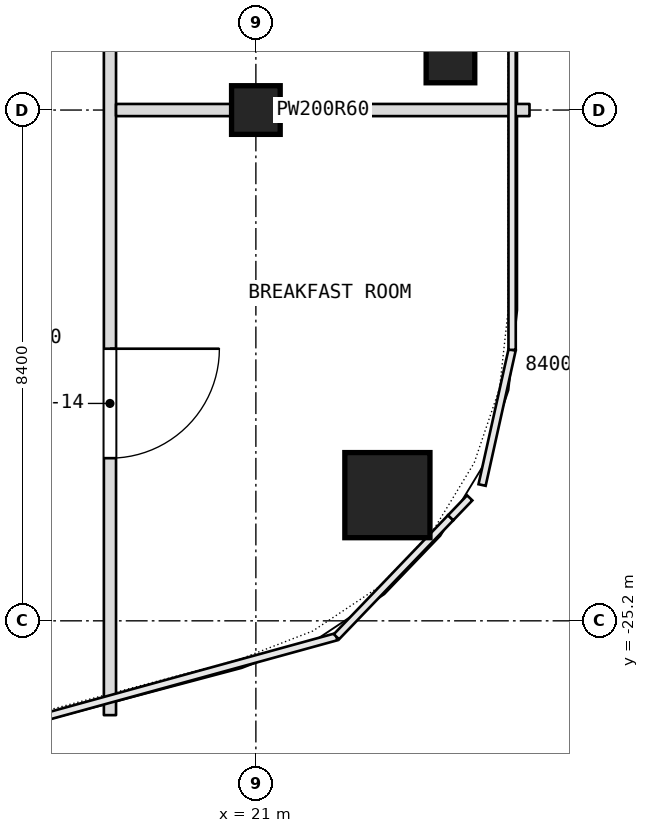
"""IFC4 building model, lengths in metres.
Left out: names, types, materials, properties, quantities, classifications, styles, units other than length and angle.
Written with IfcOpenShell. Run it as: python <this file> out.ifc"""

import sys

from ifc_helpers import new_model, si_unit, direction, frame, frame_2d, origin, origin_2d, place, context, subcontext, project, spatial, rectangle, extrude, element, fill, save


model = new_model("IFC4")
c1 = context("Model", 3, precision=1e-05, world=origin(), true_north=direction((0.0, 1.0)))
c2 = subcontext(c1, "Body", "Model", "MODEL_VIEW")
j1 = project(units=[si_unit("LENGTHUNIT", "METRE"), si_unit("PLANEANGLEUNIT", "RADIAN")], contexts=[c1])
p1 = place(None, origin())
s1 = spatial("IfcSite", under=j1, at=p1, CompositionType="ELEMENT")
p2 = place(p1, origin())
s2 = spatial("IfcBuilding", under=s1, at=p2, CompositionType="ELEMENT")
p3 = place(p2, frame((0.0, 0.0, 241.7)))
s3 = spatial("IfcBuildingStorey", under=s2, at=p3, CompositionType="ELEMENT", Elevation=241.7)
p4 = place(p3, frame((23.163, -23.133, 0.0), z_axis=(0.0, 0.0, 1.0), x_axis=(1.0, 0.0, 0.0)))
e1 = element("IfcColumn", 1, at=p4, inside=s3, PredefinedType="COLUMN", context=c2, shape_type="SweptSolid", body=[
    extrude(rectangle(XDim=1.4, YDim=1.4, at=origin_2d()), origin(), (0.0, 0.0, 1.0), 3.6),
])
for number, where, z_axis, x_axis in (
    (2, (21.0, -16.8, 0.0), (0.0, 0.0, 1.0), (1.0, 0.0, 0.0)),
    (3, (24.2, -15.952, 0.0), (0.0, 0.0, 1.0), (1.0, 0.0, 0.0)),
):
    element("IfcColumn", number, at=place(p3, frame(where, z_axis=z_axis, x_axis=x_axis)), inside=s3, PredefinedType="COLUMN", context=c2, shape_type="SweptSolid", body=[
        extrude(rectangle(XDim=0.8, YDim=0.8, at=origin_2d()), origin(), (0.0, 0.0, 1.0), 3.6),
    ])
p5 = place(p3, frame((18.6, -26.751, 0.0), z_axis=(0.0, 0.0, 1.0), x_axis=(0.0, 1.0, 0.0)))
e4 = element("IfcWall", 4, at=p5, inside=s3, PredefinedType="PARTITIONING", context=c2, shape_type="SweptSolid", body=[
    extrude(rectangle(XDim=49.091, YDim=0.2, at=frame_2d((24.545, 0.0))), origin(), (0.0, 0.0, 1.0), 3.34),
])
p6 = place(p5, frame((4.226, 0.0, 0.0)))
e5 = element("IfcOpeningElement", 5, at=p6, cuts=e4, PredefinedType="OPENING", context=c2, shape_type="SweptSolid", body=[
    extrude(rectangle(XDim=1.8, YDim=2.1, at=frame_2d((0.9, 1.05))), frame((0.0, 0.1, 0.0), z_axis=(0.0, -1.0, 0.0), x_axis=(1.0, 0.0, 0.0)), (0.0, 0.0, 1.0), 0.2),
])
p7 = place(p5, frame((13.251, 0.0, 0.0)))
e6 = element("IfcOpeningElement", 6, at=p7, cuts=e4, PredefinedType="OPENING", context=c2, shape_type="SweptSolid", body=[
    extrude(rectangle(XDim=1.8, YDim=2.1, at=frame_2d((0.9, 1.05))), frame((0.0, 0.1, 0.0), z_axis=(0.0, -1.0, 0.0), x_axis=(1.0, 0.0, 0.0)), (0.0, 0.0, 1.0), 0.2),
])
p8 = place(p5, frame((21.151, 0.0, 0.0)))
e7 = element("IfcOpeningElement", 7, at=p8, cuts=e4, PredefinedType="OPENING", context=c2, shape_type="SweptSolid", body=[
    extrude(rectangle(XDim=1.0, YDim=2.1, at=frame_2d((0.5, 1.05))), frame((0.0, 0.1, 0.0), z_axis=(0.0, -1.0, 0.0), x_axis=(1.0, 0.0, 0.0)), (0.0, 0.0, 1.0), 0.2),
])
p9 = place(p5, frame((22.951, 0.0, 0.0)))
e8 = element("IfcOpeningElement", 8, at=p9, cuts=e4, PredefinedType="OPENING", context=c2, shape_type="SweptSolid", body=[
    extrude(rectangle(XDim=1.0, YDim=2.1, at=frame_2d((0.5, 1.05))), frame((0.0, 0.1, 0.0), z_axis=(0.0, -1.0, 0.0), x_axis=(1.0, 0.0, 0.0)), (0.0, 0.0, 1.0), 0.2),
])
p10 = place(p5, frame((27.151, 0.0, 0.0)))
e9 = element("IfcOpeningElement", 9, at=p10, cuts=e4, PredefinedType="OPENING", context=c2, shape_type="SweptSolid", body=[
    extrude(rectangle(XDim=1.0, YDim=2.1, at=frame_2d((0.5, 1.05))), frame((0.0, 0.1, 0.0), z_axis=(0.0, -1.0, 0.0), x_axis=(1.0, 0.0, 0.0)), (0.0, 0.0, 1.0), 0.2),
])
p11 = place(p5, frame((33.751, 0.0, 0.0)))
e10 = element("IfcOpeningElement", 10, at=p11, cuts=e4, PredefinedType="OPENING", context=c2, shape_type="SweptSolid", body=[
    extrude(rectangle(XDim=1.0, YDim=2.1, at=frame_2d((0.5, 1.05))), frame((0.0, 0.1, 0.0), z_axis=(0.0, -1.0, 0.0), x_axis=(1.0, 0.0, 0.0)), (0.0, 0.0, 1.0), 0.2),
])
p12 = place(p5, frame((38.851, 0.0, 0.0)))
e11 = element("IfcOpeningElement", 11, at=p12, cuts=e4, PredefinedType="OPENING", context=c2, shape_type="SweptSolid", body=[
    extrude(rectangle(XDim=1.1, YDim=2.1, at=frame_2d((0.55, 1.05))), frame((0.0, 0.1, 0.0), z_axis=(0.0, -1.0, 0.0), x_axis=(1.0, 0.0, 0.0)), (0.0, 0.0, 1.0), 0.2),
])
p13 = place(p5, frame((44.051, 0.0, 0.0)))
e12 = element("IfcOpeningElement", 12, at=p13, cuts=e4, PredefinedType="OPENING", context=c2, shape_type="SweptSolid", body=[
    extrude(rectangle(XDim=1.0, YDim=2.1, at=frame_2d((0.5, 1.05))), frame((0.0, 0.1, 0.0), z_axis=(0.0, -1.0, 0.0), x_axis=(1.0, 0.0, 0.0)), (0.0, 0.0, 1.0), 0.2),
])
p14 = place(p3, frame((18.7, -16.8, 0.0), z_axis=(0.0, 0.0, 1.0), x_axis=(1.0, 0.0, 0.0)))
e13 = element("IfcWall", 13, at=p14, inside=s3, PredefinedType="PARTITIONING", context=c2, shape_type="SweptSolid", body=[
    extrude(rectangle(XDim=6.8, YDim=0.2, at=frame_2d((3.4, 0.0))), origin(), (0.0, 0.0, 1.0), 2.94),
])
p15 = place(p6, origin())
e14 = element("IfcDoor", 14, at=p15, inside=s3, OperationType="DOUBLE_DOOR_SINGLE_SWING", PredefinedType="DOOR", context=c2, shape_type="SweptSolid", body=[
    extrude(rectangle(XDim=1.8, YDim=2.1, at=frame_2d((0.9, 1.05))), frame((0.0, 0.025, 0.0), z_axis=(0.0, -1.0, 0.0), x_axis=(1.0, 0.0, 0.0)), (0.0, 0.0, 1.0), 0.05),
])
fill(e5, e14)
save(model, sys.argv[1])
